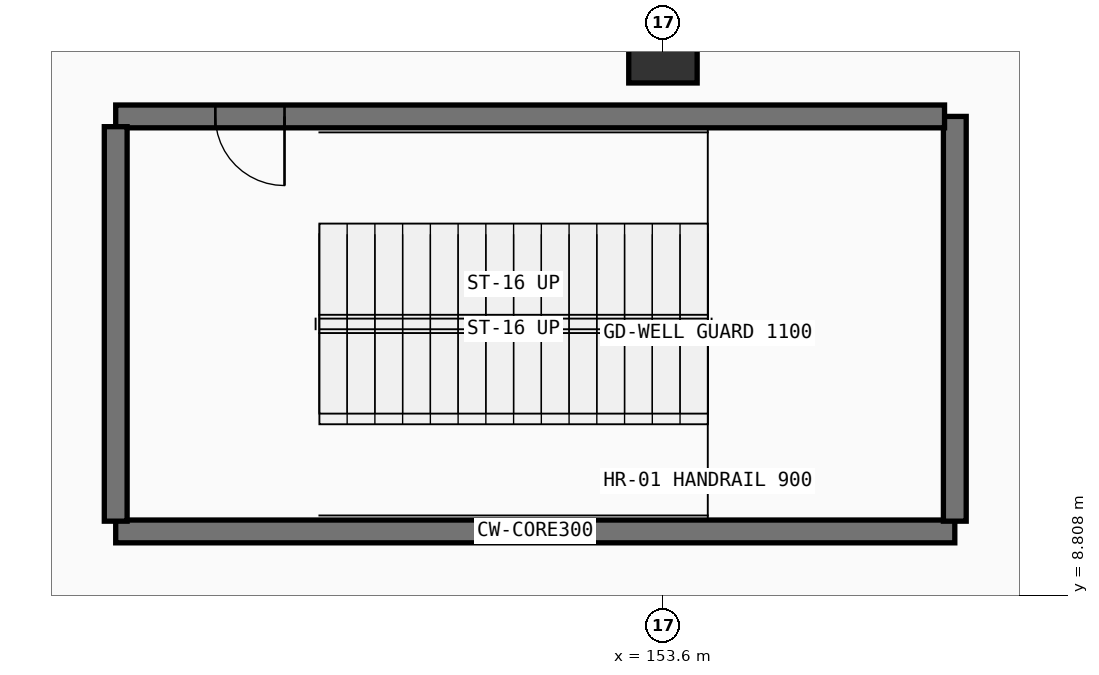
"""IFC4 building model, lengths in metres.
Left out: names, types, materials, properties, quantities, classifications, styles, units other than length and angle.
Written with IfcOpenShell. Run it as: python <this file> out.ifc"""

import sys

from ifc_helpers import new_model, si_unit, direction, frame, frame_2d, origin, origin_2d, place, context, subcontext, project, spatial, rectangle, extrude, element, fill, save


model = new_model("IFC4")
c1 = context("Model", 3, precision=1e-05, world=origin(), true_north=direction((0.0, 1.0)))
c2 = subcontext(c1, "Body", "Model", "MODEL_VIEW")
j1 = project(units=[si_unit("LENGTHUNIT", "METRE"), si_unit("PLANEANGLEUNIT", "RADIAN")], contexts=[c1])
p1 = place(None, origin())
s1 = spatial("IfcSite", under=j1, at=p1, CompositionType="ELEMENT")
p2 = place(p1, origin())
s2 = spatial("IfcBuilding", under=s1, at=p2, CompositionType="ELEMENT")
p3 = place(p2, frame((0.0, 0.0, -5.4)))
s3 = spatial("IfcBuildingStorey", under=s2, at=p3, CompositionType="ELEMENT", Elevation=-5.4)
p4 = place(p3, frame((153.6, 16.0, 0.0), z_axis=(0.0, 0.0, 1.0), x_axis=(1.0, 0.0, 0.0)))
e1 = element("IfcColumn", 1, at=p4, inside=s3, PredefinedType="COLUMN", context=c2, shape_type="SweptSolid", body=[
    extrude(rectangle(XDim=0.9, YDim=0.9, at=origin_2d()), origin(), (0.0, 0.0, 1.0), 5.4),
])
p5 = place(p3, frame((146.4, 9.65, 0.0), z_axis=(0.0, 0.0, 1.0), x_axis=(1.0, 0.0, 0.0)))
e2 = element("IfcWall", 2, at=p5, inside=s3, PredefinedType="SHEAR", context=c2, shape_type="SweptSolid", body=[
    extrude(rectangle(XDim=11.04, YDim=0.3, at=frame_2d((5.52, 0.0))), origin(), (0.0, 0.0, 1.0), 5.09),
])
p6 = place(p3, frame((157.44, 9.785, 0.0), z_axis=(0.0, 0.0, 1.0), x_axis=(0.0, 1.0, 0.0)))
e3 = element("IfcWall", 3, at=p6, inside=s3, PredefinedType="SHEAR", context=c2, shape_type="SweptSolid", body=[
    extrude(rectangle(XDim=5.325, YDim=0.3, at=frame_2d((2.663, 0.0))), origin(), (0.0, 0.0, 1.0), 5.09),
])
p7 = place(p3, frame((157.305, 15.11, 0.0), z_axis=(0.0, 0.0, 1.0), x_axis=(-1.0, 0.0, 0.0)))
e4 = element("IfcWall", 4, at=p7, inside=s3, PredefinedType="SHEAR", context=c2, shape_type="SweptSolid", body=[
    extrude(rectangle(XDim=10.905, YDim=0.3, at=frame_2d((5.453, 0.0))), origin(), (0.0, 0.0, 1.0), 5.09),
])
p8 = place(p7, frame((8.684, 0.0, 0.0)))
e5 = element("IfcOpeningElement", 5, at=p8, cuts=e4, PredefinedType="OPENING", context=c2, shape_type="SweptSolid", body=[
    extrude(rectangle(XDim=0.91, YDim=2.08, at=frame_2d((0.455, 1.04))), frame((0.0, 0.16, 0.0), z_axis=(0.0, -1.0, 0.0), x_axis=(1.0, 0.0, 0.0)), (0.0, 0.0, 1.0), 0.32),
])
p9 = place(p3, frame((146.4, 14.975, 0.0), z_axis=(0.0, 0.0, 1.0), x_axis=(0.0, -1.0, 0.0)))
e6 = element("IfcWall", 6, at=p9, inside=s3, PredefinedType="SHEAR", context=c2, shape_type="SweptSolid", body=[
    extrude(rectangle(XDim=5.19, YDim=0.3, at=frame_2d((2.595, 0.0))), origin(), (0.0, 0.0, 1.0), 5.09),
])
p10 = place(p8, origin())
e7 = element("IfcDoor", 7, at=p10, inside=s3, OperationType="SINGLE_SWING_RIGHT", PredefinedType="DOOR", context=c2, shape_type="SweptSolid", body=[
    extrude(rectangle(XDim=0.91, YDim=2.08, at=frame_2d((0.455, 1.04))), frame((0.0, 0.025, 0.0), z_axis=(0.0, -1.0, 0.0), x_axis=(1.0, 0.0, 0.0)), (0.0, 0.0, 1.0), 0.05),
])
fill(e5, e7)
save(model, sys.argv[1])
